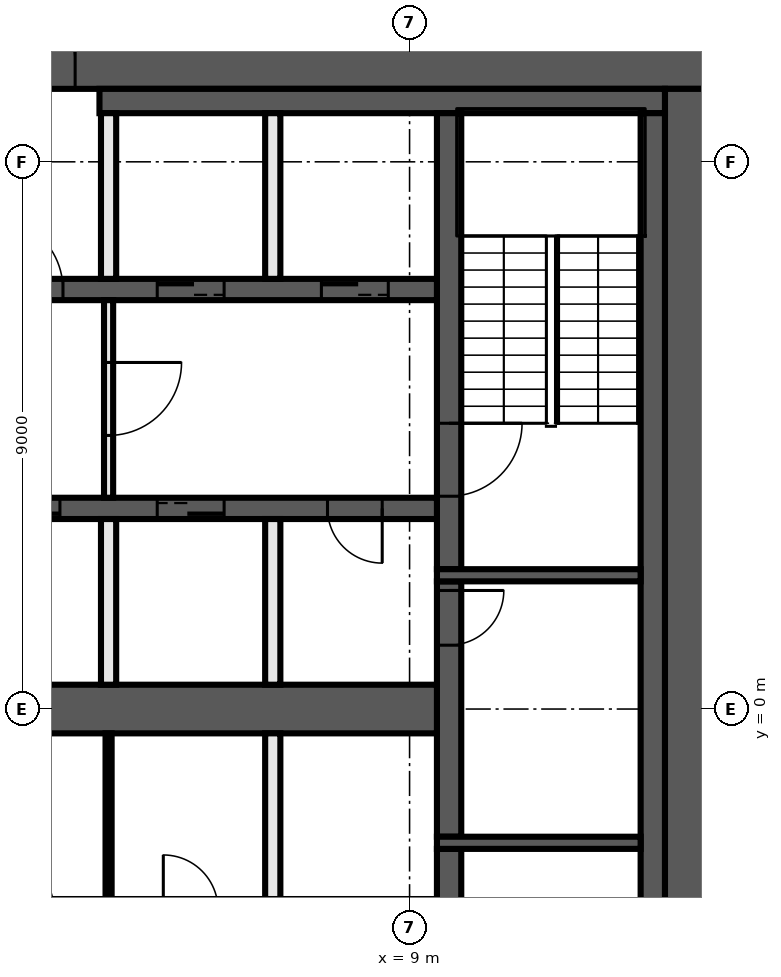
"""IFC4 building model, lengths in metres.
Left out: names, types, materials, properties, quantities, classifications, styles, units other than length and angle.
Written with IfcOpenShell. Run it as: python <this file> out.ifc"""

import sys

from ifc_helpers import new_model, si_unit, direction, frame, frame_2d, origin, place, context, subcontext, project, spatial, rectangle, extrude, element, fill, save


model = new_model("IFC4")
c1 = context("Model", 3, precision=1e-05, world=origin(), true_north=direction((0.0, 1.0)))
c2 = subcontext(c1, "Body", "Model", "MODEL_VIEW")
j1 = project(units=[si_unit("LENGTHUNIT", "METRE"), si_unit("PLANEANGLEUNIT", "RADIAN")], contexts=[c1])
p1 = place(None, origin())
s1 = spatial("IfcSite", under=j1, at=p1, CompositionType="ELEMENT")
p2 = place(p1, origin())
s2 = spatial("IfcBuilding", under=s1, at=p2, CompositionType="ELEMENT")
p3 = place(p2, frame((0.0, 0.0, 171.2)))
s3 = spatial("IfcBuildingStorey", under=s2, at=p3, CompositionType="ELEMENT", Elevation=171.2)
p4 = place(p3, frame((-14.0, 10.6, 0.0), z_axis=(0.0, 0.0, 1.0), x_axis=(1.0, 0.0, 0.0)))
e1 = element("IfcWall", 1, at=p4, inside=s3, PredefinedType="SHEAR", context=c2, shape_type="SweptSolid", body=[
    extrude(rectangle(XDim=28.0, YDim=0.8, at=frame_2d((14.0, 0.0))), origin(), (0.0, 0.0, 1.0), 3.82),
])
p5 = place(p4, frame((15.9, 0.0, 0.0)))
e2 = element("IfcOpeningElement", 2, at=p5, cuts=e1, PredefinedType="OPENING", context=c2, shape_type="SweptSolid", body=[
    extrude(rectangle(XDim=1.6, YDim=2.1, at=frame_2d((0.8, 1.05))), frame((0.0, 0.41, 0.0), z_axis=(0.0, -1.0, 0.0), x_axis=(1.0, 0.0, 0.0)), (0.0, 0.0, 1.0), 0.82),
])
p6 = place(p3, frame((13.6, 10.2, 0.0), z_axis=(0.0, 0.0, 1.0), x_axis=(0.0, -1.0, 0.0)))
e3 = element("IfcWall", 3, at=p6, inside=s3, PredefinedType="SHEAR", context=c2, shape_type="SweptSolid", body=[
    extrude(rectangle(XDim=20.4, YDim=0.8, at=frame_2d((10.2, 0.0))), origin(), (0.0, 0.0, 1.0), 3.82),
])
p7 = place(p3, frame((3.9, 10.0, 0.0), z_axis=(0.0, 0.0, 1.0), x_axis=(1.0, 0.0, 0.0)))
e4 = element("IfcWall", 4, at=p7, inside=s3, PredefinedType="SHEAR", context=c2, shape_type="SweptSolid", body=[
    extrude(rectangle(XDim=9.3, YDim=0.4, at=frame_2d((4.65, 0.0))), origin(), (0.0, 0.0, 1.0), 3.82),
])
p8 = place(p3, frame((13.0, 9.8, 0.0), z_axis=(0.0, 0.0, 1.0), x_axis=(0.0, -1.0, 0.0)))
e5 = element("IfcWall", 5, at=p8, inside=s3, PredefinedType="SHEAR", context=c2, shape_type="SweptSolid", body=[
    extrude(rectangle(XDim=19.6, YDim=0.4, at=frame_2d((9.8, 0.0))), origin(), (0.0, 0.0, 1.0), 3.82),
])
p9 = place(p3, frame((9.65, -2.3, 0.0), z_axis=(0.0, 0.0, 1.0), x_axis=(0.0, -1.0, 0.0)))
e6 = element("IfcWall", 6, at=p9, inside=s3, PredefinedType="SHEAR", context=c2, shape_type="SweptSolid", body=[
    extrude(rectangle(XDim=7.5, YDim=0.4, at=frame_2d((3.75, 0.0))), origin(), (0.0, 0.0, 1.0), 3.82),
])
p10 = place(p9, frame((1.2, 0.0, 0.0)))
e7 = element("IfcOpeningElement", 7, at=p10, cuts=e6, PredefinedType="OPENING", context=c2, shape_type="SweptSolid", body=[
    extrude(rectangle(XDim=1.2, YDim=2.1, at=frame_2d((0.6, 1.05))), frame((0.0, 0.21, 0.0), z_axis=(0.0, -1.0, 0.0), x_axis=(1.0, 0.0, 0.0)), (0.0, 0.0, 1.0), 0.42),
])
p11 = place(p3, frame((9.65, 2.1, 0.0), z_axis=(0.0, 0.0, 1.0), x_axis=(0.0, -1.0, 0.0)))
e8 = element("IfcWall", 8, at=p11, inside=s3, PredefinedType="SHEAR", context=c2, shape_type="SweptSolid", body=[
    extrude(rectangle(XDim=4.2, YDim=0.4, at=frame_2d((2.1, 0.0))), origin(), (0.0, 0.0, 1.0), 3.82),
])
p12 = place(p11, frame((0.15, 0.0, 0.0)))
e9 = element("IfcOpeningElement", 9, at=p12, cuts=e8, PredefinedType="OPENING", context=c2, shape_type="SweptSolid", body=[
    extrude(rectangle(XDim=0.9, YDim=2.1, at=frame_2d((0.45, 1.05))), frame((0.0, 0.21, 0.0), z_axis=(0.0, -1.0, 0.0), x_axis=(1.0, 0.0, 0.0)), (0.0, 0.0, 1.0), 0.42),
])
p13 = place(p3, frame((9.65, 9.8, 0.0), z_axis=(0.0, 0.0, 1.0), x_axis=(0.0, -1.0, 0.0)))
e10 = element("IfcWall", 10, at=p13, inside=s3, PredefinedType="SHEAR", context=c2, shape_type="SweptSolid", body=[
    extrude(rectangle(XDim=7.5, YDim=0.4, at=frame_2d((3.75, 0.0))), origin(), (0.0, 0.0, 1.0), 3.82),
])
p14 = place(p13, frame((5.1, 0.0, 0.0)))
e11 = element("IfcOpeningElement", 11, at=p14, cuts=e10, PredefinedType="OPENING", context=c2, shape_type="SweptSolid", body=[
    extrude(rectangle(XDim=1.2, YDim=2.1, at=frame_2d((0.6, 1.05))), frame((0.0, 0.21, 0.0), z_axis=(0.0, -1.0, 0.0), x_axis=(1.0, 0.0, 0.0)), (0.0, 0.0, 1.0), 0.42),
])
for number, where, z_axis, x_axis in (
    (12, (9.45, 2.2, 0.0), (0.0, 0.0, 1.0), (1.0, 0.0, 0.0)),
    (13, (9.45, -2.2, 0.0), (0.0, 0.0, 1.0), (1.0, 0.0, 0.0)),
):
    element("IfcWall", number, at=place(p3, frame(where, z_axis=z_axis, x_axis=x_axis)), inside=s3, PredefinedType="SHEAR", context=c2, shape_type="SweptSolid", body=[
        extrude(rectangle(XDim=3.35, YDim=0.2, at=frame_2d((1.675, 0.0))), origin(), (0.0, 0.0, 1.0), 3.82),
    ])
p15 = place(p3, frame((-9.45, 6.9, 0.0), z_axis=(0.0, 0.0, 1.0), x_axis=(1.0, 0.0, 0.0)))
e14 = element("IfcWall", 14, at=p15, inside=s3, PredefinedType="SHEAR", context=c2, shape_type="SweptSolid", body=[
    extrude(rectangle(XDim=18.9, YDim=0.35, at=frame_2d((9.45, 0.0))), origin(), (0.0, 0.0, 1.0), 3.82),
])
p16 = place(p15, frame((11.55, 0.0, 0.0)))
e15 = element("IfcOpeningElement", 15, at=p16, cuts=e14, PredefinedType="OPENING", context=c2, shape_type="SweptSolid", body=[
    extrude(rectangle(XDim=1.2, YDim=2.1, at=frame_2d((0.6, 1.05))), frame((0.0, 0.185, 0.0), z_axis=(0.0, -1.0, 0.0), x_axis=(1.0, 0.0, 0.0)), (0.0, 0.0, 1.0), 0.37),
])
p17 = place(p15, frame((14.3, 0.0, 0.0)))
e16 = element("IfcOpeningElement", 16, at=p17, cuts=e14, PredefinedType="OPENING", context=c2, shape_type="SweptSolid", body=[
    extrude(rectangle(XDim=1.1, YDim=2.1, at=frame_2d((0.55, 1.05))), frame((0.0, 0.185, 0.0), z_axis=(0.0, -1.0, 0.0), x_axis=(1.0, 0.0, 0.0)), (0.0, 0.0, 1.0), 0.37),
])
p18 = place(p15, frame((17.0, 0.0, 0.0)))
e17 = element("IfcOpeningElement", 17, at=p18, cuts=e14, PredefinedType="OPENING", context=c2, shape_type="SweptSolid", body=[
    extrude(rectangle(XDim=1.1, YDim=2.1, at=frame_2d((0.55, 1.05))), frame((0.0, 0.185, 0.0), z_axis=(0.0, -1.0, 0.0), x_axis=(1.0, 0.0, 0.0)), (0.0, 0.0, 1.0), 0.37),
])
p19 = place(p15, frame((3.6, 0.0, 0.0)))
e18 = element("IfcOpeningElement", 18, at=p19, cuts=e14, PredefinedType="OPENING", context=c2, shape_type="SweptSolid", body=[
    extrude(rectangle(XDim=0.9, YDim=2.1, at=frame_2d((0.45, 1.05))), frame((0.0, 0.185, 0.0), z_axis=(0.0, -1.0, 0.0), x_axis=(1.0, 0.0, 0.0)), (0.0, 0.0, 1.0), 0.37),
])
p20 = place(p15, frame((9.0, 0.0, 0.0)))
e19 = element("IfcOpeningElement", 19, at=p20, cuts=e14, PredefinedType="OPENING", context=c2, shape_type="SweptSolid", body=[
    extrude(rectangle(XDim=0.9, YDim=2.1, at=frame_2d((0.45, 1.05))), frame((0.0, 0.185, 0.0), z_axis=(0.0, -1.0, 0.0), x_axis=(1.0, 0.0, 0.0)), (0.0, 0.0, 1.0), 0.37),
])
p21 = place(p3, frame((9.45, 3.3, 0.0), z_axis=(0.0, 0.0, 1.0), x_axis=(-1.0, 0.0, 0.0)))
e20 = element("IfcWall", 20, at=p21, inside=s3, PredefinedType="SHEAR", context=c2, shape_type="SweptSolid", body=[
    extrude(rectangle(XDim=18.9, YDim=0.35, at=frame_2d((9.45, 0.0))), origin(), (0.0, 0.0, 1.0), 3.82),
])
p22 = place(p21, frame((6.2, 0.0, 0.0)))
e21 = element("IfcOpeningElement", 21, at=p22, cuts=e20, PredefinedType="OPENING", context=c2, shape_type="SweptSolid", body=[
    extrude(rectangle(XDim=1.1, YDim=2.1, at=frame_2d((0.55, 1.05))), frame((0.0, 0.185, 0.0), z_axis=(0.0, -1.0, 0.0), x_axis=(1.0, 0.0, 0.0)), (0.0, 0.0, 1.0), 0.37),
])
p23 = place(p21, frame((3.5, 0.0, 0.0)))
e22 = element("IfcOpeningElement", 22, at=p23, cuts=e20, PredefinedType="OPENING", context=c2, shape_type="SweptSolid", body=[
    extrude(rectangle(XDim=1.1, YDim=2.1, at=frame_2d((0.55, 1.05))), frame((0.0, 0.185, 0.0), z_axis=(0.0, -1.0, 0.0), x_axis=(1.0, 0.0, 0.0)), (0.0, 0.0, 1.0), 0.37),
])
p24 = place(p21, frame((0.9, 0.0, 0.0)))
e23 = element("IfcOpeningElement", 23, at=p24, cuts=e20, PredefinedType="OPENING", context=c2, shape_type="SweptSolid", body=[
    extrude(rectangle(XDim=0.9, YDim=2.1, at=frame_2d((0.45, 1.05))), frame((0.0, 0.185, 0.0), z_axis=(0.0, -1.0, 0.0), x_axis=(1.0, 0.0, 0.0)), (0.0, 0.0, 1.0), 0.37),
])
p25 = place(p21, frame((14.4, 0.0, 0.0)))
e24 = element("IfcOpeningElement", 24, at=p25, cuts=e20, PredefinedType="OPENING", context=c2, shape_type="SweptSolid", body=[
    extrude(rectangle(XDim=0.9, YDim=2.1, at=frame_2d((0.45, 1.05))), frame((0.0, 0.185, 0.0), z_axis=(0.0, -1.0, 0.0), x_axis=(1.0, 0.0, 0.0)), (0.0, 0.0, 1.0), 0.37),
])
p26 = place(p21, frame((9.0, 0.0, 0.0)))
e25 = element("IfcOpeningElement", 25, at=p26, cuts=e20, PredefinedType="OPENING", context=c2, shape_type="SweptSolid", body=[
    extrude(rectangle(XDim=0.9, YDim=2.1, at=frame_2d((0.45, 1.05))), frame((0.0, 0.185, 0.0), z_axis=(0.0, -1.0, 0.0), x_axis=(1.0, 0.0, 0.0)), (0.0, 0.0, 1.0), 0.37),
])
p27 = place(p3, frame((-9.45, 0.0, 0.0), z_axis=(0.0, 0.0, 1.0), x_axis=(1.0, 0.0, 0.0)))
e26 = element("IfcWall", 26, at=p27, inside=s3, PredefinedType="SHEAR", context=c2, shape_type="SweptSolid", body=[
    extrude(rectangle(XDim=18.9, YDim=0.8, at=frame_2d((9.45, 0.0))), origin(), (0.0, 0.0, 1.0), 3.82),
])
for number, where, z_axis, x_axis in (
    (27, (6.75, -3.125, 0.0), (0.0, 0.0, 1.0), (0.0, 1.0, 0.0)),
    (28, (6.75, 0.4, 0.0), (0.0, 0.0, 1.0), (0.0, 1.0, 0.0)),
    (29, (6.75, 7.075, 0.0), (0.0, 0.0, 1.0), (0.0, 1.0, 0.0)),
):
    element("IfcWall", number, at=place(p3, frame(where, z_axis=z_axis, x_axis=x_axis)), inside=s3, PredefinedType="SOLIDWALL", context=c2, shape_type="SweptSolid", body=[
        extrude(rectangle(XDim=2.725, YDim=0.25, at=frame_2d((1.363, 0.0))), origin(), (0.0, 0.0, 1.0), 3.82),
    ])
p28 = place(p3, frame((4.05, 6.725, 0.0), z_axis=(0.0, 0.0, 1.0), x_axis=(0.0, -1.0, 0.0)))
e30 = element("IfcWall", 30, at=p28, inside=s3, PredefinedType="PARTITIONING", context=c2, shape_type="SweptSolid", body=[
    extrude(rectangle(XDim=3.25, YDim=0.15, at=frame_2d((1.625, 0.0))), origin(), (0.0, 0.0, 1.0), 3.82),
])
p29 = place(p28, frame((1.025, 0.0, 0.0)))
e31 = element("IfcOpeningElement", 31, at=p29, cuts=e30, PredefinedType="OPENING", context=c2, shape_type="SweptSolid", body=[
    extrude(rectangle(XDim=1.2, YDim=2.1, at=frame_2d((0.6, 1.05))), frame((0.0, 0.085, 0.0), z_axis=(0.0, -1.0, 0.0), x_axis=(1.0, 0.0, 0.0)), (0.0, 0.0, 1.0), 0.17),
])
p30 = place(p3, frame((4.05, -3.125, 0.0), z_axis=(0.0, 0.0, 1.0), x_axis=(0.0, 1.0, 0.0)))
e32 = element("IfcWall", 32, at=p30, inside=s3, PredefinedType="PARTITIONING", context=c2, shape_type="SweptSolid", body=[
    extrude(rectangle(XDim=2.725, YDim=0.1, at=frame_2d((1.363, 0.0))), origin(), (0.0, 0.0, 1.0), 3.82),
])
for number, where, z_axis, x_axis in (
    (33, (4.05, 0.4, 0.0), (0.0, 0.0, 1.0), (0.0, 1.0, 0.0)),
    (34, (4.05, 7.075, 0.0), (0.0, 0.0, 1.0), (0.0, 1.0, 0.0)),
):
    element("IfcWall", number, at=place(p3, frame(where, z_axis=z_axis, x_axis=x_axis)), inside=s3, PredefinedType="SOLIDWALL", context=c2, shape_type="SweptSolid", body=[
        extrude(rectangle(XDim=2.725, YDim=0.25, at=frame_2d((1.363, 0.0))), origin(), (0.0, 0.0, 1.0), 3.82),
    ])
p31 = place(p12, origin())
e35 = element("IfcDoor", 35, at=p31, inside=s3, OperationType="SINGLE_SWING_RIGHT", PredefinedType="DOOR", context=c2, shape_type="SweptSolid", body=[
    extrude(rectangle(XDim=0.9, YDim=2.1, at=frame_2d((0.45, 1.05))), frame((0.0, 0.025, 0.0), z_axis=(0.0, -1.0, 0.0), x_axis=(1.0, 0.0, 0.0)), (0.0, 0.0, 1.0), 0.05),
])
fill(e9, e35)
p32 = place(p5, origin())
e36 = element("IfcDoor", 36, at=p32, inside=s3, OperationType="DOUBLE_DOOR_SINGLE_SWING", PredefinedType="DOOR", context=c2, shape_type="SweptSolid", body=[
    extrude(rectangle(XDim=1.6, YDim=2.1, at=frame_2d((0.8, 1.05))), frame((0.0, 0.025, 0.0), z_axis=(0.0, -1.0, 0.0), x_axis=(1.0, 0.0, 0.0)), (0.0, 0.0, 1.0), 0.05),
])
fill(e2, e36)
p33 = place(p16, origin())
e37 = element("IfcDoor", 37, at=p33, inside=s3, OperationType="SINGLE_SWING_LEFT", PredefinedType="DOOR", context=c2, shape_type="SweptSolid", body=[
    extrude(rectangle(XDim=1.2, YDim=2.1, at=frame_2d((0.6, 1.05))), frame((0.0, 0.025, 0.0), z_axis=(0.0, -1.0, 0.0), x_axis=(1.0, 0.0, 0.0)), (0.0, 0.0, 1.0), 0.05),
])
fill(e15, e37)
p34 = place(p17, origin())
e38 = element("IfcDoor", 38, at=p34, inside=s3, OperationType="DOUBLE_DOOR_SLIDING", PredefinedType="DOOR", context=c2, shape_type="SweptSolid", body=[
    extrude(rectangle(XDim=1.1, YDim=2.1, at=frame_2d((0.55, 1.05))), frame((0.0, 0.025, 0.0), z_axis=(0.0, -1.0, 0.0), x_axis=(1.0, 0.0, 0.0)), (0.0, 0.0, 1.0), 0.05),
])
fill(e16, e38)
p35 = place(p18, origin())
e39 = element("IfcDoor", 39, at=p35, inside=s3, OperationType="DOUBLE_DOOR_SLIDING", PredefinedType="DOOR", context=c2, shape_type="SweptSolid", body=[
    extrude(rectangle(XDim=1.1, YDim=2.1, at=frame_2d((0.55, 1.05))), frame((0.0, 0.025, 0.0), z_axis=(0.0, -1.0, 0.0), x_axis=(1.0, 0.0, 0.0)), (0.0, 0.0, 1.0), 0.05),
])
fill(e17, e39)
p36 = place(p22, origin())
e40 = element("IfcDoor", 40, at=p36, inside=s3, OperationType="DOUBLE_DOOR_SLIDING", PredefinedType="DOOR", context=c2, shape_type="SweptSolid", body=[
    extrude(rectangle(XDim=1.1, YDim=2.1, at=frame_2d((0.55, 1.05))), frame((0.0, 0.025, 0.0), z_axis=(0.0, -1.0, 0.0), x_axis=(1.0, 0.0, 0.0)), (0.0, 0.0, 1.0), 0.05),
])
fill(e21, e40)
p37 = place(p23, origin())
e41 = element("IfcDoor", 41, at=p37, inside=s3, OperationType="DOUBLE_DOOR_SLIDING", PredefinedType="DOOR", context=c2, shape_type="SweptSolid", body=[
    extrude(rectangle(XDim=1.1, YDim=2.1, at=frame_2d((0.55, 1.05))), frame((0.0, 0.025, 0.0), z_axis=(0.0, -1.0, 0.0), x_axis=(1.0, 0.0, 0.0)), (0.0, 0.0, 1.0), 0.05),
])
fill(e22, e41)
p38 = place(p24, origin())
e42 = element("IfcDoor", 42, at=p38, inside=s3, OperationType="SINGLE_SWING_LEFT", PredefinedType="DOOR", context=c2, shape_type="SweptSolid", body=[
    extrude(rectangle(XDim=0.9, YDim=2.1, at=frame_2d((0.45, 1.05))), frame((0.0, 0.025, 0.0), z_axis=(0.0, -1.0, 0.0), x_axis=(1.0, 0.0, 0.0)), (0.0, 0.0, 1.0), 0.05),
])
fill(e23, e42)
p39 = place(p14, origin())
e43 = element("IfcDoor", 43, at=p39, inside=s3, OperationType="SINGLE_SWING_LEFT", PredefinedType="DOOR", context=c2, shape_type="SweptSolid", body=[
    extrude(rectangle(XDim=1.2, YDim=2.1, at=frame_2d((0.6, 1.05))), frame((0.0, 0.025, 0.0), z_axis=(0.0, -1.0, 0.0), x_axis=(1.0, 0.0, 0.0)), (0.0, 0.0, 1.0), 0.05),
])
fill(e11, e43)
p40 = place(p29, origin())
e44 = element("IfcDoor", 44, at=p40, inside=s3, OperationType="SINGLE_SWING_RIGHT", PredefinedType="DOOR", context=c2, shape_type="SweptSolid", body=[
    extrude(rectangle(XDim=1.2, YDim=2.1, at=frame_2d((0.6, 1.05))), frame((0.0, 0.025, 0.0), z_axis=(0.0, -1.0, 0.0), x_axis=(1.0, 0.0, 0.0)), (0.0, 0.0, 1.0), 0.05),
])
fill(e31, e44)
save(model, sys.argv[1])
